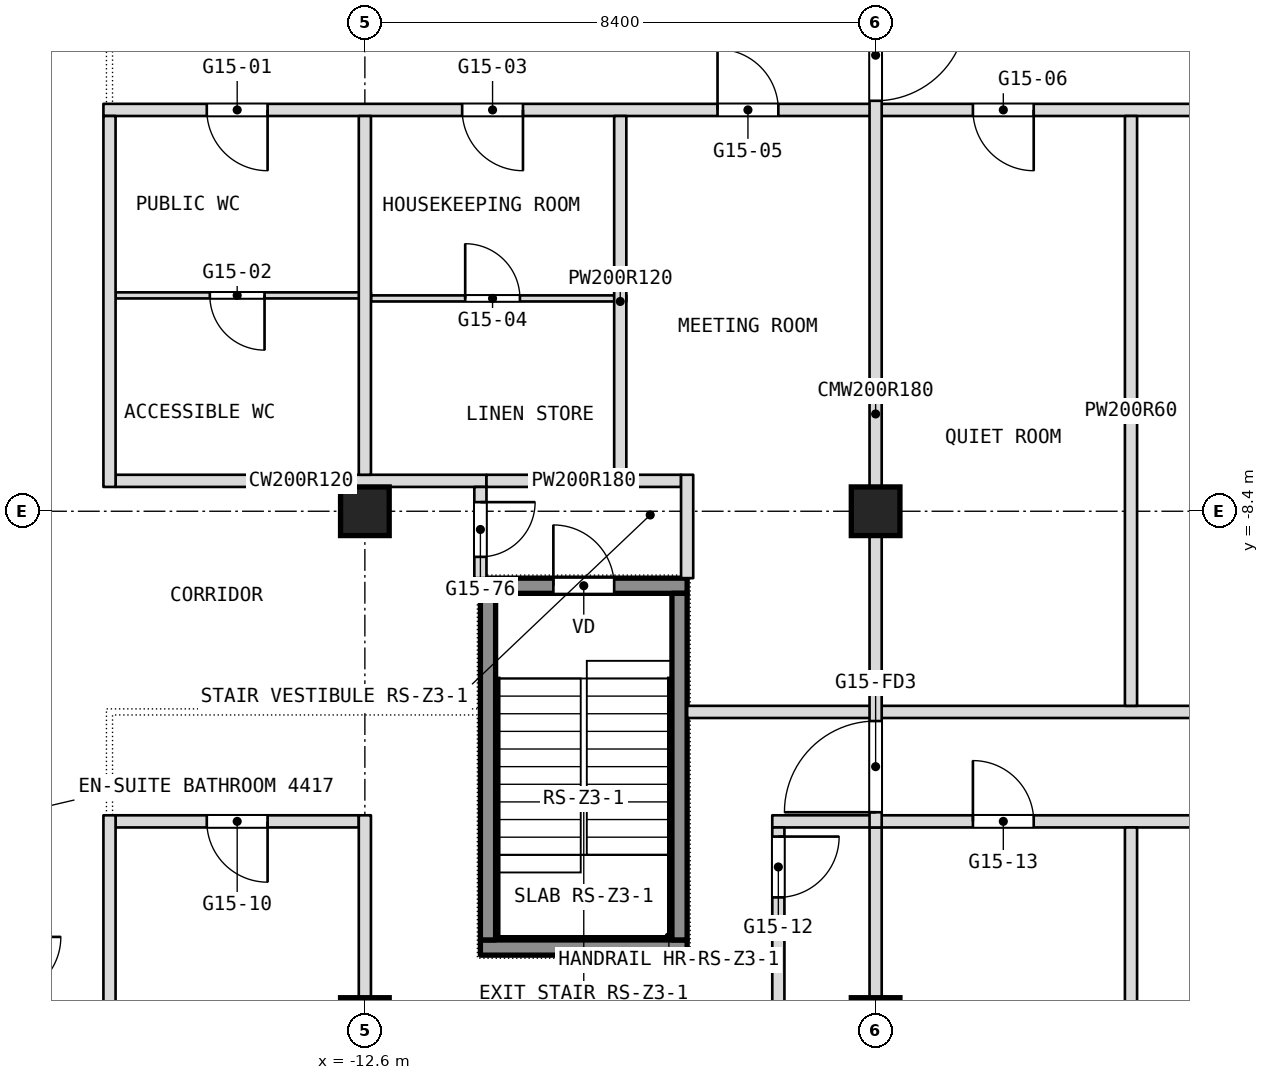
"""IFC4 building model, lengths in metres.
Left out: names, types, materials, properties, quantities, classifications, styles, units other than length and angle.
Written with IfcOpenShell. Run it as: python <this file> out.ifc"""

import sys

from ifc_helpers import new_model, si_unit, direction, frame, frame_2d, origin, origin_2d, place, context, subcontext, project, spatial, rectangle, extrude, element, fill, save


model = new_model("IFC4")
c1 = context("Model", 3, precision=1e-05, world=origin(), true_north=direction((0.0, 1.0)))
c2 = subcontext(c1, "Body", "Model", "MODEL_VIEW")
j1 = project(units=[si_unit("LENGTHUNIT", "METRE"), si_unit("PLANEANGLEUNIT", "RADIAN")], contexts=[c1])
p1 = place(None, origin())
s1 = spatial("IfcSite", under=j1, at=p1, CompositionType="ELEMENT")
p2 = place(p1, origin())
s2 = spatial("IfcBuilding", under=s1, at=p2, CompositionType="ELEMENT")
p3 = place(p2, frame((0.0, 0.0, 194.9)))
s3 = spatial("IfcBuildingStorey", under=s2, at=p3, CompositionType="ELEMENT", Elevation=194.9)
for number, where, z_axis, x_axis in (
    (1, (-12.6, -16.8, 0.0), (0.0, 0.0, 1.0), (1.0, 0.0, 0.0)),
    (2, (-12.6, -8.4, 0.0), (0.0, 0.0, 1.0), (1.0, 0.0, 0.0)),
    (3, (-4.2, -16.8, 0.0), (0.0, 0.0, 1.0), (1.0, 0.0, 0.0)),
    (4, (-4.2, -8.4, 0.0), (0.0, 0.0, 1.0), (1.0, 0.0, 0.0)),
):
    element("IfcColumn", number, at=place(p3, frame(where, z_axis=z_axis, x_axis=x_axis)), inside=s3, PredefinedType="COLUMN", context=c2, shape_type="SweptSolid", body=[
        extrude(rectangle(XDim=0.8, YDim=0.8, at=origin_2d()), origin(), (0.0, 0.0, 1.0), 3.6),
    ])
p4 = place(p3, frame((-16.7, -13.5, 0.0), z_axis=(0.0, 0.0, 1.0), x_axis=(1.0, 0.0, 0.0)))
e5 = element("IfcWall", 5, at=p4, inside=s3, PredefinedType="PARTITIONING", context=c2, shape_type="SweptSolid", body=[
    extrude(rectangle(XDim=4.0, YDim=0.2, at=frame_2d((2.0, 0.0))), origin(), (0.0, 0.0, 1.0), 3.34),
])
p5 = place(p4, frame((1.5, 0.0, 0.0)))
e6 = element("IfcOpeningElement", 6, at=p5, cuts=e5, PredefinedType="OPENING", context=c2, shape_type="SweptSolid", body=[
    extrude(rectangle(XDim=1.0, YDim=2.1, at=frame_2d((0.5, 1.05))), frame((0.0, 0.1, 0.0), z_axis=(0.0, -1.0, 0.0), x_axis=(1.0, 0.0, 0.0)), (0.0, 0.0, 1.0), 0.2),
])
p6 = place(p3, frame((-5.9, -13.5, 0.0), z_axis=(0.0, 0.0, 1.0), x_axis=(1.0, 0.0, 0.0)))
e7 = element("IfcWall", 7, at=p6, inside=s3, PredefinedType="PARTITIONING", context=c2, shape_type="SweptSolid", body=[
    extrude(rectangle(XDim=11.6, YDim=0.2, at=frame_2d((5.8, 0.0))), origin(), (0.0, 0.0, 1.0), 3.34),
])
p7 = place(p6, frame((3.3, 0.0, 0.0)))
e8 = element("IfcOpeningElement", 8, at=p7, cuts=e7, PredefinedType="OPENING", context=c2, shape_type="SweptSolid", body=[
    extrude(rectangle(XDim=1.0, YDim=2.1, at=frame_2d((0.5, 1.05))), frame((0.0, 0.1, 0.0), z_axis=(0.0, -1.0, 0.0), x_axis=(1.0, 0.0, 0.0)), (0.0, 0.0, 1.0), 0.2),
])
p8 = place(p6, frame((7.5, 0.0, 0.0)))
e9 = element("IfcOpeningElement", 9, at=p8, cuts=e7, PredefinedType="OPENING", context=c2, shape_type="SweptSolid", body=[
    extrude(rectangle(XDim=1.0, YDim=2.1, at=frame_2d((0.5, 1.05))), frame((0.0, 0.1, 0.0), z_axis=(0.0, -1.0, 0.0), x_axis=(1.0, 0.0, 0.0)), (0.0, 0.0, 1.0), 0.2),
])
p9 = place(p6, frame((10.45, 0.0, 0.0)))
e10 = element("IfcOpeningElement", 10, at=p9, cuts=e7, PredefinedType="OPENING", context=c2, shape_type="SweptSolid", body=[
    extrude(rectangle(XDim=1.0, YDim=2.1, at=frame_2d((0.5, 1.05))), frame((0.0, 0.1, 0.0), z_axis=(0.0, -1.0, 0.0), x_axis=(1.0, 0.0, 0.0)), (0.0, 0.0, 1.0), 0.2),
])
p10 = place(p3, frame((-7.3, -11.7, 0.0), z_axis=(0.0, 0.0, 1.0), x_axis=(1.0, 0.0, 0.0)))
e11 = element("IfcWall", 11, at=p10, inside=s3, PredefinedType="PARTITIONING", context=c2, shape_type="SweptSolid", body=[
    extrude(rectangle(XDim=14.6, YDim=0.2, at=frame_2d((7.3, 0.0))), origin(), (0.0, 0.0, 1.0), 3.34),
])
p11 = place(p3, frame((-16.7, -7.9, 0.0), z_axis=(0.0, 0.0, 1.0), x_axis=(1.0, 0.0, 0.0)))
e12 = element("IfcWall", 12, at=p11, inside=s3, PredefinedType="PARTITIONING", context=c2, shape_type="SweptSolid", body=[
    extrude(rectangle(XDim=6.1, YDim=0.2, at=frame_2d((3.05, 0.0))), origin(), (0.0, 0.0, 1.0), 3.34),
])
p12 = place(p3, frame((-10.6, -7.9, 0.0), z_axis=(0.0, 0.0, 1.0), x_axis=(1.0, 0.0, 0.0)))
e13 = element("IfcWall", 13, at=p12, inside=s3, PredefinedType="PARTITIONING", context=c2, shape_type="SweptSolid", body=[
    extrude(rectangle(XDim=3.2, YDim=0.2, at=frame_2d((1.6, 0.0))), origin(), (0.0, 0.0, 1.0), 3.34),
])
p13 = place(p3, frame((-12.5, -4.9, 0.0), z_axis=(0.0, 0.0, 1.0), x_axis=(1.0, 0.0, 0.0)))
e14 = element("IfcWall", 14, at=p13, inside=s3, PredefinedType="PARTITIONING", context=c2, shape_type="SweptSolid", body=[
    extrude(rectangle(XDim=4.2, YDim=0.1, at=frame_2d((2.1, 0.0))), origin(), (0.0, 0.0, 1.0), 3.34),
])
p14 = place(p13, frame((1.55, 0.0, 0.0)))
e15 = element("IfcOpeningElement", 15, at=p14, cuts=e14, PredefinedType="OPENING", context=c2, shape_type="SweptSolid", body=[
    extrude(rectangle(XDim=0.9, YDim=2.1, at=frame_2d((0.45, 1.05))), frame((0.0, 0.05, 0.0), z_axis=(0.0, -1.0, 0.0), x_axis=(1.0, 0.0, 0.0)), (0.0, 0.0, 1.0), 0.1),
])
p15 = place(p3, frame((-16.7, -4.85, 0.0), z_axis=(0.0, 0.0, 1.0), x_axis=(1.0, 0.0, 0.0)))
e16 = element("IfcWall", 16, at=p15, inside=s3, PredefinedType="PARTITIONING", context=c2, shape_type="SweptSolid", body=[
    extrude(rectangle(XDim=4.2, YDim=0.1, at=frame_2d((2.1, 0.0))), origin(), (0.0, 0.0, 1.0), 3.34),
])
p16 = place(p15, frame((1.55, 0.0, 0.0)))
e17 = element("IfcOpeningElement", 17, at=p16, cuts=e16, PredefinedType="OPENING", context=c2, shape_type="SweptSolid", body=[
    extrude(rectangle(XDim=0.9, YDim=2.1, at=frame_2d((0.45, 1.05))), frame((0.0, 0.05, 0.0), z_axis=(0.0, -1.0, 0.0), x_axis=(1.0, 0.0, 0.0)), (0.0, 0.0, 1.0), 0.1),
])
p17 = place(p3, frame((-16.9, -1.8, 0.0), z_axis=(0.0, 0.0, 1.0), x_axis=(1.0, 0.0, 0.0)))
e18 = element("IfcWall", 18, at=p17, inside=s3, PredefinedType="PARTITIONING", context=c2, shape_type="SweptSolid", body=[
    extrude(rectangle(XDim=33.8, YDim=0.2, at=frame_2d((16.9, 0.0))), origin(), (0.0, 0.0, 1.0), 3.34),
])
p18 = place(p17, frame((1.7, 0.0, 0.0)))
e19 = element("IfcOpeningElement", 19, at=p18, cuts=e18, PredefinedType="OPENING", context=c2, shape_type="SweptSolid", body=[
    extrude(rectangle(XDim=1.0, YDim=2.1, at=frame_2d((0.5, 1.05))), frame((0.0, 0.1, 0.0), z_axis=(0.0, -1.0, 0.0), x_axis=(1.0, 0.0, 0.0)), (0.0, 0.0, 1.0), 0.2),
])
p19 = place(p17, frame((5.9, 0.0, 0.0)))
e20 = element("IfcOpeningElement", 20, at=p19, cuts=e18, PredefinedType="OPENING", context=c2, shape_type="SweptSolid", body=[
    extrude(rectangle(XDim=1.0, YDim=2.1, at=frame_2d((0.5, 1.05))), frame((0.0, 0.1, 0.0), z_axis=(0.0, -1.0, 0.0), x_axis=(1.0, 0.0, 0.0)), (0.0, 0.0, 1.0), 0.2),
])
p20 = place(p17, frame((10.1, 0.0, 0.0)))
e21 = element("IfcOpeningElement", 21, at=p20, cuts=e18, PredefinedType="OPENING", context=c2, shape_type="SweptSolid", body=[
    extrude(rectangle(XDim=1.0, YDim=2.1, at=frame_2d((0.5, 1.05))), frame((0.0, 0.1, 0.0), z_axis=(0.0, -1.0, 0.0), x_axis=(1.0, 0.0, 0.0)), (0.0, 0.0, 1.0), 0.2),
])
p21 = place(p17, frame((14.3, 0.0, 0.0)))
e22 = element("IfcOpeningElement", 22, at=p21, cuts=e18, PredefinedType="OPENING", context=c2, shape_type="SweptSolid", body=[
    extrude(rectangle(XDim=1.0, YDim=2.1, at=frame_2d((0.5, 1.05))), frame((0.0, 0.1, 0.0), z_axis=(0.0, -1.0, 0.0), x_axis=(1.0, 0.0, 0.0)), (0.0, 0.0, 1.0), 0.2),
])
p22 = place(p17, frame((18.5, 0.0, 0.0)))
e23 = element("IfcOpeningElement", 23, at=p22, cuts=e18, PredefinedType="OPENING", context=c2, shape_type="SweptSolid", body=[
    extrude(rectangle(XDim=1.0, YDim=2.1, at=frame_2d((0.5, 1.05))), frame((0.0, 0.1, 0.0), z_axis=(0.0, -1.0, 0.0), x_axis=(1.0, 0.0, 0.0)), (0.0, 0.0, 1.0), 0.2),
])
p23 = place(p17, frame((24.4, 0.0, 0.0)))
e24 = element("IfcOpeningElement", 24, at=p23, cuts=e18, PredefinedType="OPENING", context=c2, shape_type="SweptSolid", body=[
    extrude(rectangle(XDim=1.8, YDim=2.1, at=frame_2d((0.9, 1.05))), frame((0.0, 0.1, 0.0), z_axis=(0.0, -1.0, 0.0), x_axis=(1.0, 0.0, 0.0)), (0.0, 0.0, 1.0), 0.2),
])
p24 = place(p17, frame((31.1, 0.0, 0.0)))
e25 = element("IfcOpeningElement", 25, at=p24, cuts=e18, PredefinedType="OPENING", context=c2, shape_type="SweptSolid", body=[
    extrude(rectangle(XDim=1.0, YDim=2.1, at=frame_2d((0.5, 1.05))), frame((0.0, 0.1, 0.0), z_axis=(0.0, -1.0, 0.0), x_axis=(1.0, 0.0, 0.0)), (0.0, 0.0, 1.0), 0.2),
])
p25 = place(p3, frame((0.0, -20.0, 0.0), z_axis=(0.0, 0.0, 1.0), x_axis=(0.0, 1.0, 0.0)))
e26 = element("IfcWall", 26, at=p25, inside=s3, PredefinedType="PARTITIONING", context=c2, shape_type="SweptSolid", body=[
    extrude(rectangle(XDim=6.4, YDim=0.2, at=frame_2d((3.2, 0.0))), origin(), (0.0, 0.0, 1.0), 3.34),
])
p26 = place(p3, frame((0.0, -11.6, 0.0), z_axis=(0.0, 0.0, 1.0), x_axis=(0.0, 1.0, 0.0)))
e27 = element("IfcWall", 27, at=p26, inside=s3, PredefinedType="PARTITIONING", context=c2, shape_type="SweptSolid", body=[
    extrude(rectangle(XDim=9.7, YDim=0.2, at=frame_2d((4.85, 0.0))), origin(), (0.0, 0.0, 1.0), 3.34),
])
p27 = place(p3, frame((-4.2, -22.0, 0.0), z_axis=(0.0, 0.0, 1.0), x_axis=(0.0, 1.0, 0.0)))
e28 = element("IfcWall", 28, at=p27, inside=s3, PredefinedType="PARTITIONING", context=c2, shape_type="SweptSolid", body=[
    extrude(rectangle(XDim=8.4, YDim=0.2, at=frame_2d((4.2, 0.0))), origin(), (0.0, 0.0, 1.0), 3.34),
])
p28 = place(p27, frame((0.25, 0.0, 0.0)))
e29 = element("IfcOpeningElement", 29, at=p28, cuts=e28, PredefinedType="OPENING", context=c2, shape_type="SweptSolid", body=[
    extrude(rectangle(XDim=1.5, YDim=2.1, at=frame_2d((0.75, 1.05))), frame((0.0, 0.1, 0.0), z_axis=(0.0, -1.0, 0.0), x_axis=(1.0, 0.0, 0.0)), (0.0, 0.0, 1.0), 0.2),
])
p29 = place(p3, frame((-4.2, -13.6, 0.0), z_axis=(0.0, 0.0, 1.0), x_axis=(0.0, 1.0, 0.0)))
e30 = element("IfcWall", 30, at=p29, inside=s3, PredefinedType="PARTITIONING", context=c2, shape_type="SweptSolid", body=[
    extrude(rectangle(XDim=13.6, YDim=0.2, at=frame_2d((6.8, 0.0))), origin(), (0.0, 0.0, 1.0), 3.34),
])
p30 = place(p29, frame((11.95, 0.0, 0.0)))
e31 = element("IfcOpeningElement", 31, at=p30, cuts=e30, PredefinedType="OPENING", context=c2, shape_type="SweptSolid", body=[
    extrude(rectangle(XDim=1.5, YDim=2.1, at=frame_2d((0.75, 1.05))), frame((0.0, 0.1, 0.0), z_axis=(0.0, -1.0, 0.0), x_axis=(1.0, 0.0, 0.0)), (0.0, 0.0, 1.0), 0.2),
])
p31 = place(p29, frame((0.25, 0.0, 0.0)))
e32 = element("IfcOpeningElement", 32, at=p31, cuts=e30, PredefinedType="OPENING", context=c2, shape_type="SweptSolid", body=[
    extrude(rectangle(XDim=1.5, YDim=2.1, at=frame_2d((0.75, 1.05))), frame((0.0, 0.1, 0.0), z_axis=(0.0, -1.0, 0.0), x_axis=(1.0, 0.0, 0.0)), (0.0, 0.0, 1.0), 0.2),
])
p32 = place(p3, frame((-5.8, -18.5, 0.0), z_axis=(0.0, 0.0, 1.0), x_axis=(0.0, 1.0, 0.0)))
e33 = element("IfcWall", 33, at=p32, inside=s3, PredefinedType="PARTITIONING", context=c2, shape_type="SweptSolid", body=[
    extrude(rectangle(XDim=4.9, YDim=0.2, at=frame_2d((2.45, 0.0))), origin(), (0.0, 0.0, 1.0), 3.34),
])
p33 = place(p32, frame((3.75, 0.0, 0.0)))
e34 = element("IfcOpeningElement", 34, at=p33, cuts=e33, PredefinedType="OPENING", context=c2, shape_type="SweptSolid", body=[
    extrude(rectangle(XDim=1.0, YDim=2.1, at=frame_2d((0.5, 1.05))), frame((0.0, 0.1, 0.0), z_axis=(0.0, -1.0, 0.0), x_axis=(1.0, 0.0, 0.0)), (0.0, 0.0, 1.0), 0.2),
])
p34 = place(p3, frame((-7.3, -9.5, 0.0), z_axis=(0.0, 0.0, 1.0), x_axis=(0.0, 1.0, 0.0)))
e35 = element("IfcWall", 35, at=p34, inside=s3, PredefinedType="PARTITIONING", context=c2, shape_type="SweptSolid", body=[
    extrude(rectangle(XDim=1.7, YDim=0.2, at=frame_2d((0.85, 0.0))), origin(), (0.0, 0.0, 1.0), 3.34),
])
p35 = place(p3, frame((-8.4, -8.0, 0.0), z_axis=(0.0, 0.0, 1.0), x_axis=(0.0, 1.0, 0.0)))
e36 = element("IfcWall", 36, at=p35, inside=s3, PredefinedType="PARTITIONING", context=c2, shape_type="SweptSolid", body=[
    extrude(rectangle(XDim=6.1, YDim=0.2, at=frame_2d((3.05, 0.0))), origin(), (0.0, 0.0, 1.0), 3.34),
])
p36 = place(p3, frame((-10.7, -9.5, 0.0), z_axis=(0.0, 0.0, 1.0), x_axis=(0.0, 1.0, 0.0)))
e37 = element("IfcWall", 37, at=p36, inside=s3, PredefinedType="PARTITIONING", context=c2, shape_type="SweptSolid", body=[
    extrude(rectangle(XDim=1.5, YDim=0.2, at=frame_2d((0.75, 0.0))), origin(), (0.0, 0.0, 1.0), 3.34),
])
p37 = place(p36, frame((0.35, 0.0, 0.0)))
e38 = element("IfcOpeningElement", 38, at=p37, cuts=e37, PredefinedType="OPENING", context=c2, shape_type="SweptSolid", body=[
    extrude(rectangle(XDim=0.9, YDim=2.1, at=frame_2d((0.45, 1.05))), frame((0.0, 0.1, 0.0), z_axis=(0.0, -1.0, 0.0), x_axis=(1.0, 0.0, 0.0)), (0.0, 0.0, 1.0), 0.2),
])
p38 = place(p3, frame((-12.6, -7.8, 0.0), z_axis=(0.0, 0.0, 1.0), x_axis=(0.0, 1.0, 0.0)))
e39 = element("IfcWall", 39, at=p38, inside=s3, PredefinedType="PARTITIONING", context=c2, shape_type="SweptSolid", body=[
    extrude(rectangle(XDim=5.9, YDim=0.2, at=frame_2d((2.95, 0.0))), origin(), (0.0, 0.0, 1.0), 3.34),
])
p39 = place(p3, frame((-12.6, -18.5, 0.0), z_axis=(0.0, 0.0, 1.0), x_axis=(0.0, 1.0, 0.0)))
e40 = element("IfcWall", 40, at=p39, inside=s3, PredefinedType="PARTITIONING", context=c2, shape_type="SweptSolid", body=[
    extrude(rectangle(XDim=5.1, YDim=0.2, at=frame_2d((2.55, 0.0))), origin(), (0.0, 0.0, 1.0), 3.34),
])
p40 = place(p3, frame((-16.8, -20.2, 0.0), z_axis=(0.0, 0.0, 1.0), x_axis=(0.0, 1.0, 0.0)))
e41 = element("IfcWall", 41, at=p40, inside=s3, PredefinedType="PARTITIONING", context=c2, shape_type="SweptSolid", body=[
    extrude(rectangle(XDim=6.8, YDim=0.2, at=frame_2d((3.4, 0.0))), origin(), (0.0, 0.0, 1.0), 3.34),
])
p41 = place(p3, frame((-16.8, -8.0, 0.0), z_axis=(0.0, 0.0, 1.0), x_axis=(0.0, 1.0, 0.0)))
e42 = element("IfcWall", 42, at=p41, inside=s3, PredefinedType="PARTITIONING", context=c2, shape_type="SweptSolid", body=[
    extrude(rectangle(XDim=6.1, YDim=0.2, at=frame_2d((3.05, 0.0))), origin(), (0.0, 0.0, 1.0), 3.34),
])
p42 = place(p3, frame((-10.7, -15.575, 0.1), z_axis=(0.0, 0.0, 1.0), x_axis=(1.0, 0.0, 0.0)))
e43 = element("IfcWall", 43, at=p42, inside=s3, PredefinedType="SHEAR", context=c2, shape_type="SweptSolid", body=[
    extrude(rectangle(XDim=3.4, YDim=0.25, at=frame_2d((1.7, 0.0))), origin(), (0.0, 0.0, 1.0), 3.6),
])
p43 = place(p3, frame((-10.7, -9.625, 0.1), z_axis=(0.0, 0.0, 1.0), x_axis=(1.0, 0.0, 0.0)))
e44 = element("IfcWall", 44, at=p43, inside=s3, PredefinedType="SHEAR", context=c2, shape_type="SweptSolid", body=[
    extrude(rectangle(XDim=3.4, YDim=0.25, at=frame_2d((1.7, 0.0))), origin(), (0.0, 0.0, 1.0), 3.6),
])
p44 = place(p43, frame((1.2, 0.0, 0.0)))
e45 = element("IfcOpeningElement", 45, at=p44, cuts=e44, PredefinedType="OPENING", context=c2, shape_type="SweptSolid", body=[
    extrude(rectangle(XDim=1.0, YDim=2.1, at=frame_2d((0.5, 1.05))), frame((0.0, 0.125, 0.0), z_axis=(0.0, -1.0, 0.0), x_axis=(1.0, 0.0, 0.0)), (0.0, 0.0, 1.0), 0.25),
])
for number, where, z_axis, x_axis in (
    (46, (-10.575, -15.45, 0.1), (0.0, 0.0, 1.0), (0.0, 1.0, 0.0)),
    (47, (-7.425, -15.45, 0.1), (0.0, 0.0, 1.0), (0.0, 1.0, 0.0)),
):
    element("IfcWall", number, at=place(p3, frame(where, z_axis=z_axis, x_axis=x_axis)), inside=s3, PredefinedType="SHEAR", context=c2, shape_type="SweptSolid", body=[
        extrude(rectangle(XDim=5.7, YDim=0.25, at=frame_2d((2.85, 0.0))), origin(), (0.0, 0.0, 1.0), 3.6),
    ])
p45 = place(p5, origin())
e48 = element("IfcDoor", 48, at=p45, inside=s3, OperationType="SINGLE_SWING_RIGHT", PredefinedType="DOOR", context=c2, shape_type="SweptSolid", body=[
    extrude(rectangle(XDim=1.0, YDim=2.1, at=frame_2d((0.5, 1.05))), frame((0.0, 0.025, 0.0), z_axis=(0.0, -1.0, 0.0), x_axis=(1.0, 0.0, 0.0)), (0.0, 0.0, 1.0), 0.05),
])
fill(e6, e48)
p46 = place(p7, origin())
e49 = element("IfcDoor", 49, at=p46, inside=s3, OperationType="SINGLE_SWING_LEFT", PredefinedType="DOOR", context=c2, shape_type="SweptSolid", body=[
    extrude(rectangle(XDim=1.0, YDim=2.1, at=frame_2d((0.5, 1.05))), frame((0.0, 0.025, 0.0), z_axis=(0.0, -1.0, 0.0), x_axis=(1.0, 0.0, 0.0)), (0.0, 0.0, 1.0), 0.05),
])
fill(e8, e49)
p47 = place(p14, origin())
e50 = element("IfcDoor", 50, at=p47, inside=s3, OperationType="SINGLE_SWING_RIGHT", PredefinedType="DOOR", context=c2, shape_type="SweptSolid", body=[
    extrude(rectangle(XDim=0.9, YDim=2.1, at=frame_2d((0.45, 1.05))), frame((0.0, 0.025, 0.0), z_axis=(0.0, -1.0, 0.0), x_axis=(1.0, 0.0, 0.0)), (0.0, 0.0, 1.0), 0.05),
])
fill(e15, e50)
p48 = place(p16, origin())
e51 = element("IfcDoor", 51, at=p48, inside=s3, OperationType="SINGLE_SWING_RIGHT", PredefinedType="DOOR", context=c2, shape_type="SweptSolid", body=[
    extrude(rectangle(XDim=0.9, YDim=2.1, at=frame_2d((0.45, 1.05))), frame((0.0, 0.025, 0.0), z_axis=(0.0, -1.0, 0.0), x_axis=(1.0, 0.0, 0.0)), (0.0, 0.0, 1.0), 0.05),
])
fill(e17, e51)
p49 = place(p18, origin())
e52 = element("IfcDoor", 52, at=p49, inside=s3, OperationType="SINGLE_SWING_LEFT", PredefinedType="DOOR", context=c2, shape_type="SweptSolid", body=[
    extrude(rectangle(XDim=1.0, YDim=2.1, at=frame_2d((0.5, 1.05))), frame((0.0, 0.025, 0.0), z_axis=(0.0, -1.0, 0.0), x_axis=(1.0, 0.0, 0.0)), (0.0, 0.0, 1.0), 0.05),
])
fill(e19, e52)
p50 = place(p19, origin())
e53 = element("IfcDoor", 53, at=p50, inside=s3, OperationType="SINGLE_SWING_LEFT", PredefinedType="DOOR", context=c2, shape_type="SweptSolid", body=[
    extrude(rectangle(XDim=1.0, YDim=2.1, at=frame_2d((0.5, 1.05))), frame((0.0, 0.025, 0.0), z_axis=(0.0, -1.0, 0.0), x_axis=(1.0, 0.0, 0.0)), (0.0, 0.0, 1.0), 0.05),
])
fill(e20, e53)
p51 = place(p20, origin())
e54 = element("IfcDoor", 54, at=p51, inside=s3, OperationType="SINGLE_SWING_RIGHT", PredefinedType="DOOR", context=c2, shape_type="SweptSolid", body=[
    extrude(rectangle(XDim=1.0, YDim=2.1, at=frame_2d((0.5, 1.05))), frame((0.0, 0.025, 0.0), z_axis=(0.0, -1.0, 0.0), x_axis=(1.0, 0.0, 0.0)), (0.0, 0.0, 1.0), 0.05),
])
fill(e21, e54)
p52 = place(p21, origin())
e55 = element("IfcDoor", 55, at=p52, inside=s3, OperationType="SINGLE_SWING_LEFT", PredefinedType="DOOR", context=c2, shape_type="SweptSolid", body=[
    extrude(rectangle(XDim=1.0, YDim=2.1, at=frame_2d((0.5, 1.05))), frame((0.0, 0.025, 0.0), z_axis=(0.0, -1.0, 0.0), x_axis=(1.0, 0.0, 0.0)), (0.0, 0.0, 1.0), 0.05),
])
fill(e22, e55)
p53 = place(p33, origin())
e56 = element("IfcDoor", 56, at=p53, inside=s3, OperationType="SINGLE_SWING_RIGHT", PredefinedType="DOOR", context=c2, shape_type="SweptSolid", body=[
    extrude(rectangle(XDim=1.0, YDim=2.1, at=frame_2d((0.5, 1.05))), frame((0.0, 0.025, 0.0), z_axis=(0.0, -1.0, 0.0), x_axis=(1.0, 0.0, 0.0)), (0.0, 0.0, 1.0), 0.05),
])
fill(e34, e56)
p54 = place(p37, origin())
e57 = element("IfcDoor", 57, at=p54, inside=s3, OperationType="SINGLE_SWING_LEFT", PredefinedType="DOOR", context=c2, shape_type="SweptSolid", body=[
    extrude(rectangle(XDim=0.9, YDim=2.1, at=frame_2d((0.45, 1.05))), frame((0.0, 0.025, 0.0), z_axis=(0.0, -1.0, 0.0), x_axis=(1.0, 0.0, 0.0)), (0.0, 0.0, 1.0), 0.05),
])
fill(e38, e57)
p55 = place(p44, origin())
e58 = element("IfcDoor", 58, at=p55, inside=s3, OperationType="SINGLE_SWING_LEFT", PredefinedType="DOOR", context=c2, shape_type="SweptSolid", body=[
    extrude(rectangle(XDim=1.0, YDim=2.1, at=frame_2d((0.5, 1.05))), frame((0.0, 0.025, 0.0), z_axis=(0.0, -1.0, 0.0), x_axis=(1.0, 0.0, 0.0)), (0.0, 0.0, 1.0), 0.05),
])
fill(e45, e58)
p56 = place(p30, origin())
e59 = element("IfcDoor", 59, at=p56, inside=s3, OperationType="DOUBLE_DOOR_DOUBLE_SWING", PredefinedType="DOOR", context=c2, shape_type="SweptSolid", body=[
    extrude(rectangle(XDim=1.5, YDim=2.1, at=frame_2d((0.75, 1.05))), frame((0.0, 0.025, 0.0), z_axis=(0.0, -1.0, 0.0), x_axis=(1.0, 0.0, 0.0)), (0.0, 0.0, 1.0), 0.05),
])
fill(e31, e59)
p57 = place(p31, origin())
e60 = element("IfcDoor", 60, at=p57, inside=s3, OperationType="DOUBLE_DOOR_DOUBLE_SWING", PredefinedType="DOOR", context=c2, shape_type="SweptSolid", body=[
    extrude(rectangle(XDim=1.5, YDim=2.1, at=frame_2d((0.75, 1.05))), frame((0.0, 0.025, 0.0), z_axis=(0.0, -1.0, 0.0), x_axis=(1.0, 0.0, 0.0)), (0.0, 0.0, 1.0), 0.05),
])
fill(e32, e60)
save(model, sys.argv[1])
